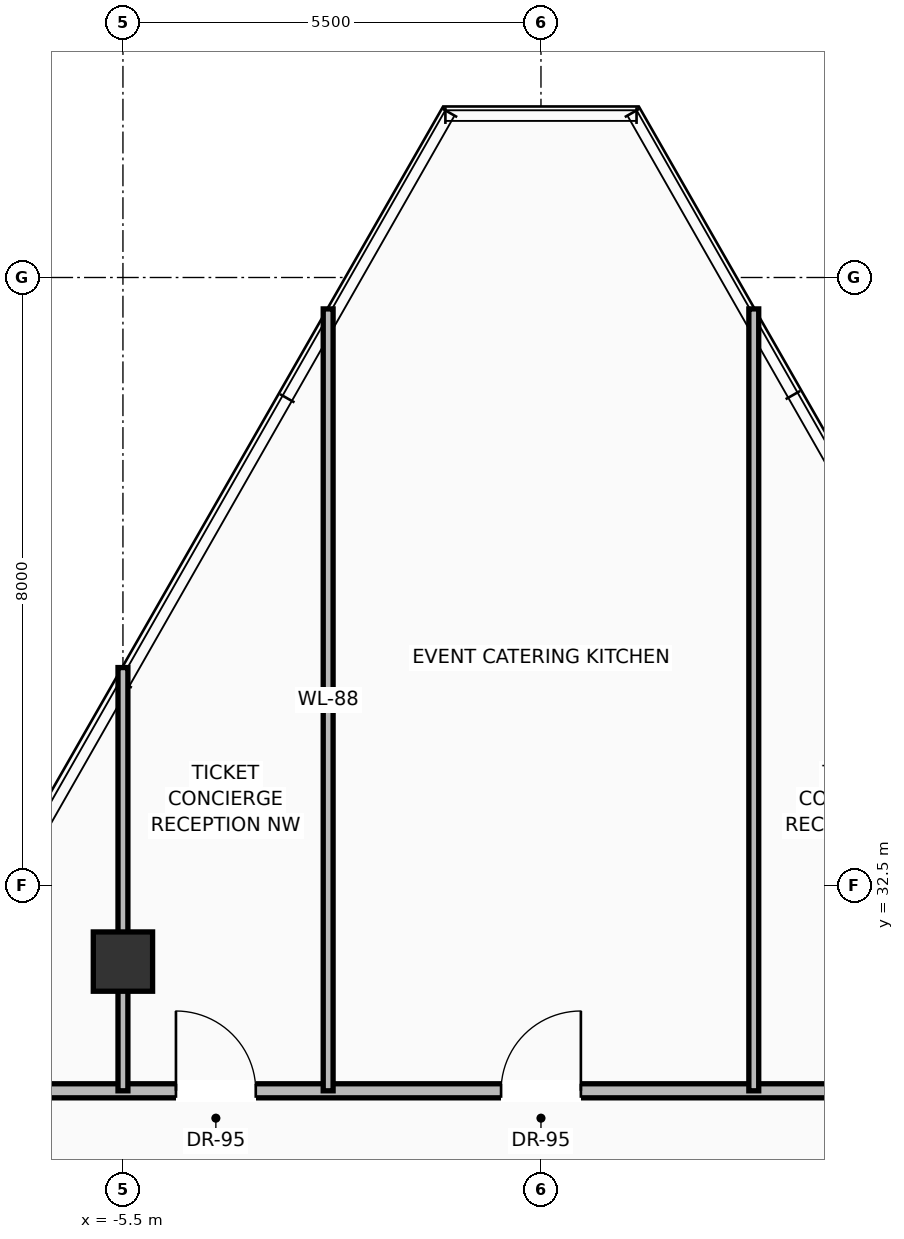
"""IFC4 building model, lengths in metres.
Left out: names, types, materials, properties, quantities, classifications, styles, units other than length and angle.
Written with IfcOpenShell. Run it as: python <this file> out.ifc"""

import sys

from ifc_helpers import new_model, si_unit, direction, frame, frame_2d, origin, origin_2d, place, context, subcontext, project, spatial, rectangle, extrude, source, transform, mapped, element, fill, save


model = new_model("IFC4")
c1 = context("Model", 3, precision=1e-05, world=origin(), true_north=direction((0.0, 1.0)))
c2 = subcontext(c1, "Body", "Model", "MODEL_VIEW")
j1 = project(units=[si_unit("LENGTHUNIT", "METRE"), si_unit("PLANEANGLEUNIT", "RADIAN")], contexts=[c1])
p1 = place(None, origin())
s1 = spatial("IfcSite", under=j1, at=p1, CompositionType="ELEMENT")
p2 = place(p1, origin())
s2 = spatial("IfcBuilding", under=s1, at=p2, CompositionType="ELEMENT")
p3 = place(p2, frame((0.0, 0.0, 300.6)))
s3 = spatial("IfcBuildingStorey", under=s2, at=p3, CompositionType="ELEMENT", Elevation=300.6)
m1 = source(origin(), c2, "Body", "SweptSolid", [
    extrude(rectangle(XDim=0.78, YDim=0.78, at=origin_2d()), origin(), (0.0, 0.0, 1.0), 3.45),
])
p4 = place(p3, frame((-5.5, 31.5, 0.0), z_axis=(0.0, 0.0, 1.0), x_axis=(1.0, 0.0, 0.0)))
e1 = element("IfcColumn", 1, at=p4, inside=s3, PredefinedType="COLUMN", context=c2, shape_type="MappedRepresentation", body=[
    mapped(m1, transform((0.0, 0.0, 0.0), scale=1.0)),
])
p5 = place(p3, frame((-8.15, 29.8, 0.0), z_axis=(0.0, 0.0, 1.0), x_axis=(1.0, 0.0, 0.0)))
e2 = element("IfcWall", 2, at=p5, inside=s3, PredefinedType="PARTITIONING", context=c2, shape_type="SweptSolid", body=[
    extrude(rectangle(XDim=16.3, YDim=0.185, at=frame_2d((8.15, 0.0))), origin(), (0.0, 0.0, 1.0), 3.142),
])
p6 = place(p5, frame((3.347, 0.0, 0.0)))
e3 = element("IfcOpeningElement", 3, at=p6, cuts=e2, PredefinedType="OPENING", context=c2, shape_type="SweptSolid", body=[
    extrude(rectangle(XDim=1.05, YDim=2.25, at=frame_2d((0.525, 1.125))), frame((0.0, 0.103, 0.0), z_axis=(0.0, -1.0, 0.0), x_axis=(1.0, 0.0, 0.0)), (0.0, 0.0, 1.0), 0.205),
])
p7 = place(p5, frame((7.625, 0.0, 0.0)))
e4 = element("IfcOpeningElement", 4, at=p7, cuts=e2, PredefinedType="OPENING", context=c2, shape_type="SweptSolid", body=[
    extrude(rectangle(XDim=1.05, YDim=2.25, at=frame_2d((0.525, 1.125))), frame((0.0, 0.103, 0.0), z_axis=(0.0, -1.0, 0.0), x_axis=(1.0, 0.0, 0.0)), (0.0, 0.0, 1.0), 0.205),
])
p8 = place(p5, frame((11.903, 0.0, 0.0)))
e5 = element("IfcOpeningElement", 5, at=p8, cuts=e2, PredefinedType="OPENING", context=c2, shape_type="SweptSolid", body=[
    extrude(rectangle(XDim=1.05, YDim=2.25, at=frame_2d((0.525, 1.125))), frame((0.0, 0.103, 0.0), z_axis=(0.0, -1.0, 0.0), x_axis=(1.0, 0.0, 0.0)), (0.0, 0.0, 1.0), 0.205),
])
p9 = place(p3, frame((-5.5, 29.8, 0.0), z_axis=(0.0, 0.0, 1.0), x_axis=(0.0, 1.0, 0.0)))
e6 = element("IfcWall", 6, at=p9, inside=s3, PredefinedType="PARTITIONING", context=c2, shape_type="SweptSolid", body=[
    extrude(rectangle(XDim=5.568, YDim=0.13, at=frame_2d((2.784, 0.0))), origin(), (0.0, 0.0, 1.0), 2.593),
])
for number, where, z_axis, x_axis in (
    (7, (-2.8, 29.8, 0.0), (0.0, 0.0, 1.0), (0.0, 1.0, 0.0)),
    (8, (2.8, 29.8, 0.0), (0.0, 0.0, 1.0), (0.0, 1.0, 0.0)),
):
    element("IfcWall", number, at=place(p3, frame(where, z_axis=z_axis, x_axis=x_axis)), inside=s3, PredefinedType="PARTITIONING", context=c2, shape_type="SweptSolid", body=[
        extrude(rectangle(XDim=10.287, YDim=0.13, at=frame_2d((5.143, 0.0))), origin(), (0.0, 0.0, 1.0), 3.142),
    ])
m2 = source(origin(), c2, "Body", "SweptSolid", [
    extrude(rectangle(XDim=1.05, YDim=2.25, at=frame_2d((0.525, 1.125))), frame((0.0, 0.025, 0.0), z_axis=(0.0, -1.0, 0.0), x_axis=(1.0, 0.0, 0.0)), (0.0, 0.0, 1.0), 0.05),
])
p10 = place(p6, origin())
e9 = element("IfcDoor", 9, at=p10, inside=s3, OperationType="SINGLE_SWING_LEFT", PredefinedType="DOOR", context=c2, shape_type="MappedRepresentation", body=[
    mapped(m2, transform((0.0, 0.0, 0.0), scale=1.0)),
])
fill(e3, e9)
p11 = place(p7, origin())
e10 = element("IfcDoor", 10, at=p11, inside=s3, OperationType="SINGLE_SWING_RIGHT", PredefinedType="DOOR", context=c2, shape_type="MappedRepresentation", body=[
    mapped(m2, transform((0.0, 0.0, 0.0), scale=1.0)),
])
fill(e4, e10)
save(model, sys.argv[1])
